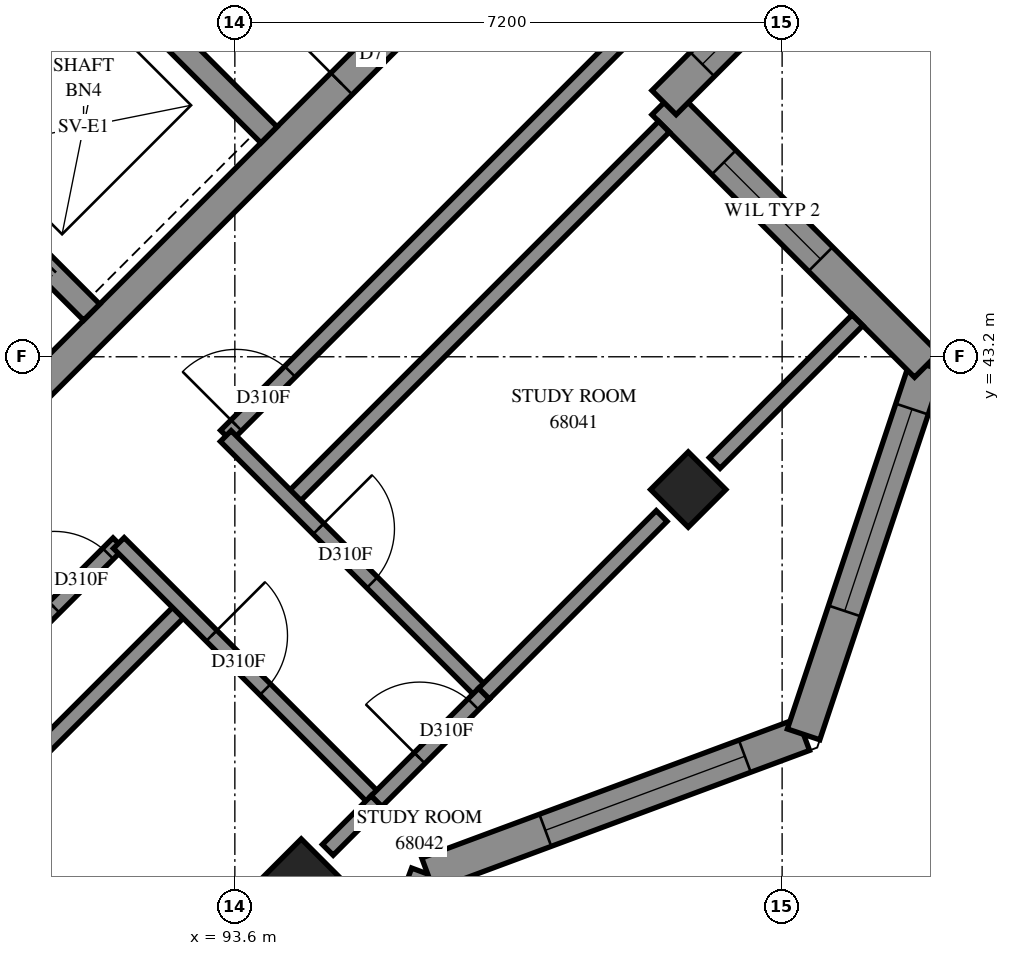
"""IFC4 building model, lengths in metres.
Left out: names, types, materials, properties, quantities, classifications, styles, units other than length and angle.
Written with IfcOpenShell. Run it as: python <this file> out.ifc"""

import sys

from ifc_helpers import new_model, si_unit, direction, frame, frame_2d, origin, origin_2d, place, context, subcontext, project, spatial, polyline, rectangle, outline, extrude, element, fill, save


model = new_model("IFC4")
c1 = context("Model", 3, precision=1e-05, world=origin(), true_north=direction((0.0, 1.0)))
c2 = subcontext(c1, "Body", "Model", "MODEL_VIEW")
j1 = project(units=[si_unit("LENGTHUNIT", "METRE"), si_unit("PLANEANGLEUNIT", "RADIAN")], contexts=[c1])
p1 = place(None, origin())
s1 = spatial("IfcSite", under=j1, at=p1, CompositionType="ELEMENT")
p2 = place(p1, origin())
s2 = spatial("IfcBuilding", under=s1, at=p2, CompositionType="ELEMENT")
p3 = place(p2, frame((0.0, 0.0, 250.6)))
s3 = spatial("IfcBuildingStorey", under=s2, at=p3, CompositionType="ELEMENT", Elevation=250.6)
for number, where, z_axis, x_axis in (
    (1, (99.565, 41.453, 0.0), (0.0, 0.0, 1.0), (0.707, -0.707, 0.0)),
    (2, (94.474, 36.362, 0.0), (0.0, 0.0, 1.0), (0.707, -0.707, 0.0)),
):
    element("IfcColumn", number, at=place(p3, frame(where, z_axis=z_axis, x_axis=x_axis)), inside=s3, PredefinedType="COLUMN", context=c2, shape_type="SweptSolid", body=[
        extrude(rectangle(XDim=0.7, YDim=0.7, at=origin_2d()), origin(), (0.0, 0.0, 1.0), 3.1),
    ])
p4 = place(p3, frame((86.978, 38.766, -0.3), z_axis=(0.0, 0.0, 1.0), x_axis=(0.7071067812, 0.7071067812, 0.0)))
e3 = element("IfcWall", 3, at=p4, inside=s3, PredefinedType="SHEAR", context=c2, shape_type="SweptSolid", body=[
    extrude(rectangle(XDim=14.4, YDim=0.4, at=frame_2d((7.2, 0.0))), origin(), (0.0, 0.0, 1.0), 2.7),
])
p5 = place(p4, frame((4.55, 0.0, 0.3)))
e4 = element("IfcOpeningElement", 4, at=p5, cuts=e3, PredefinedType="OPENING", context=c2, shape_type="SweptSolid", body=[
    extrude(rectangle(XDim=1.1, YDim=2.1, at=frame_2d((0.55, 1.05))), frame((0.0, 0.21, 0.0), z_axis=(0.0, -1.0, 0.0), x_axis=(1.0, 0.0, 0.0)), (0.0, 0.0, 1.0), 0.42),
])
p6 = place(p4, frame((11.35, 0.0, 0.3)))
e5 = element("IfcOpeningElement", 5, at=p6, cuts=e3, PredefinedType="OPENING", context=c2, shape_type="SweptSolid", body=[
    extrude(rectangle(XDim=1.1, YDim=2.1, at=frame_2d((0.55, 1.05))), frame((0.0, 0.21, 0.0), z_axis=(0.0, -1.0, 0.0), x_axis=(1.0, 0.0, 0.0)), (0.0, 0.0, 1.0), 0.42),
])
p7 = place(p3, frame((89.17, 46.332, 0.0), z_axis=(0.0, 0.0, 1.0), x_axis=(0.7071067812, 0.7071067812, 0.0)))
e6 = element("IfcWall", 6, at=p7, inside=s3, PredefinedType="SOLIDWALL", context=c2, shape_type="SweptSolid", body=[
    extrude(rectangle(XDim=3.3, YDim=0.3, at=frame_2d((1.65, 0.0))), origin(), (0.0, 0.0, 1.0), 3.1),
])
p8 = place(p3, frame((81.534, 53.969, 0.0), z_axis=(0.0, 0.0, 1.0), x_axis=(0.707103309, -0.7071102534, 0.0)))
e7 = element("IfcWall", 7, at=p8, inside=s3, PredefinedType="SOLIDWALL", context=c2, shape_type="SweptSolid", body=[
    extrude(rectangle(XDim=14.4, YDim=0.3, at=frame_2d((7.2, 0.0))), origin(), (0.0, 0.0, 1.0), 3.1),
])
p9 = place(p8, frame((8.55, 0.0, 0.0)))
e8 = element("IfcOpeningElement", 8, at=p9, cuts=e7, PredefinedType="OPENING", context=c2, shape_type="SweptSolid", body=[
    extrude(rectangle(XDim=0.9, YDim=2.1, at=frame_2d((0.45, 1.05))), frame((0.0, 0.16, 0.0), z_axis=(0.0, -1.0, 0.0), x_axis=(1.0, 0.0, 0.0)), (0.0, 0.0, 1.0), 0.32),
])
p10 = place(p8, frame((1.25, 0.0, 0.0)))
e9 = element("IfcOpeningElement", 9, at=p10, cuts=e7, PredefinedType="OPENING", context=c2, shape_type="SweptSolid", body=[
    extrude(rectangle(XDim=1.1, YDim=2.1, at=frame_2d((0.55, 1.05))), frame((0.0, 0.16, 0.0), z_axis=(0.0, -1.0, 0.0), x_axis=(1.0, 0.0, 0.0)), (0.0, 0.0, 1.0), 0.32),
])
p11 = place(p8, frame((4.85, 0.0, 0.0)))
e10 = element("IfcOpeningElement", 10, at=p11, cuts=e7, PredefinedType="OPENING", context=c2, shape_type="SweptSolid", body=[
    extrude(rectangle(XDim=1.1, YDim=2.1, at=frame_2d((0.55, 1.05))), frame((0.0, 0.16, 0.0), z_axis=(0.0, -1.0, 0.0), x_axis=(1.0, 0.0, 0.0)), (0.0, 0.0, 1.0), 0.32),
])
p12 = place(p8, frame((12.05, 0.0, 0.0)))
e11 = element("IfcOpeningElement", 11, at=p12, cuts=e7, PredefinedType="OPENING", context=c2, shape_type="SweptSolid", body=[
    extrude(rectangle(XDim=1.1, YDim=2.1, at=frame_2d((0.55, 1.05))), frame((0.0, 0.16, 0.0), z_axis=(0.0, -1.0, 0.0), x_axis=(1.0, 0.0, 0.0)), (0.0, 0.0, 1.0), 0.32),
])
p13 = place(p3, frame((88.958, 51.211, 0.0), z_axis=(0.0, 0.0, 1.0), x_axis=(0.7070998367, -0.7071137256, 0.0)))
e12 = element("IfcWall", 12, at=p13, inside=s3, PredefinedType="SOLIDWALL", context=c2, shape_type="SweptSolid", body=[
    extrude(rectangle(XDim=7.2, YDim=0.3, at=frame_2d((3.6, 0.0))), origin(), (0.0, 0.0, 1.0), 3.1),
])
p14 = place(p3, frame((94.3, 31.45, 0.0), z_axis=(0.0, 0.0, 1.0), x_axis=(0.3481927166, 0.9374229739, 0.0)))
e13 = element("IfcWall", 13, at=p14, inside=s3, PredefinedType="SOLIDWALL", context=c2, shape_type="SweptSolid", body=[
    extrude(outline(polyline([(-0.108, -0.225), (5.172, -0.225), (5.379, 0.225), (0.108, 0.225), (-0.108, -0.225)])), origin(), (0.0, 0.0, 1.0), 3.1),
])
p15 = place(p14, frame((1.534, 0.0, 0.45)))
e14 = element("IfcOpeningElement", 14, at=p15, cuts=e13, PredefinedType="OPENING", context=c2, shape_type="SweptSolid", body=[
    extrude(rectangle(XDim=2.8, YDim=2.55, at=frame_2d((1.4, 1.275))), frame((0.0, 0.235, 0.0), z_axis=(0.0, -1.0, 0.0), x_axis=(1.0, 0.0, 0.0)), (0.0, 0.0, 1.0), 0.47),
])
p16 = place(p3, frame((96.137, 36.395, 0.0), z_axis=(0.0, 0.0, 1.0), x_axis=(0.937429161, 0.3481760591, 0.0)))
e15 = element("IfcWall", 15, at=p16, inside=s3, PredefinedType="SOLIDWALL", context=c2, shape_type="SweptSolid", body=[
    extrude(outline(polyline([(0.103, -0.225), (5.383, -0.225), (5.168, 0.225), (-0.103, 0.225), (0.103, -0.225)])), origin(), (0.0, 0.0, 1.0), 3.1),
])
p17 = place(p16, frame((1.651, 0.0, 0.45)))
e16 = element("IfcOpeningElement", 16, at=p17, cuts=e15, PredefinedType="OPENING", context=c2, shape_type="SweptSolid", body=[
    extrude(rectangle(XDim=2.8, YDim=2.55, at=frame_2d((1.4, 1.275))), frame((0.0, 0.235, 0.0), z_axis=(0.0, -1.0, 0.0), x_axis=(1.0, 0.0, 0.0)), (0.0, 0.0, 1.0), 0.47),
])
p18 = place(p3, frame((101.082, 38.232, 0.0), z_axis=(0.0, 0.0, 1.0), x_axis=(0.316227766, 0.9486832981, 0.0)))
e17 = element("IfcWall", 17, at=p18, inside=s3, PredefinedType="SOLIDWALL", context=c2, shape_type="SweptSolid", body=[
    extrude(outline(polyline([(-0.108, -0.225), (5.259, -0.225), (4.981, 0.225), (0.108, 0.225), (-0.108, -0.225)])), origin(), (0.0, 0.0, 1.0), 3.1),
])
p19 = place(p18, frame((1.711, 0.0, 0.45)))
e18 = element("IfcOpeningElement", 18, at=p19, cuts=e17, PredefinedType="OPENING", context=c2, shape_type="SweptSolid", body=[
    extrude(rectangle(XDim=2.8, YDim=2.55, at=frame_2d((1.4, 1.275))), frame((0.0, 0.235, 0.0), z_axis=(0.0, -1.0, 0.0), x_axis=(1.0, 0.0, 0.0)), (0.0, 0.0, 1.0), 0.47),
])
p20 = place(p3, frame((102.701, 43.089, 0.0), z_axis=(0.0, 0.0, 1.0), x_axis=(-0.7070965479, 0.7071170144, 0.0)))
e19 = element("IfcWall", 19, at=p20, inside=s3, PredefinedType="SOLIDWALL", context=c2, shape_type="SweptSolid", body=[
    extrude(outline(polyline([(-0.139, -0.225), (4.661, -0.225), (5.111, 0.225), (0.139, 0.225), (-0.139, -0.225)])), origin(), (0.0, 0.0, 1.0), 3.1),
])
p21 = place(p20, frame((1.974, 0.0, 0.6)))
e20 = element("IfcOpeningElement", 20, at=p21, cuts=e19, PredefinedType="OPENING", context=c2, shape_type="SweptSolid", body=[
    extrude(rectangle(XDim=1.8, YDim=1.9, at=frame_2d((0.9, 0.95))), frame((0.0, 0.235, 0.0), z_axis=(0.0, -1.0, 0.0), x_axis=(1.0, 0.0, 0.0)), (0.0, 0.0, 1.0), 0.47),
])
p22 = place(p3, frame((99.246, 46.544, 0.0), z_axis=(0.0, 0.0, 1.0), x_axis=(0.7071067812, 0.7071067812, 0.0)))
e21 = element("IfcWall", 21, at=p22, inside=s3, PredefinedType="SOLIDWALL", context=c2, shape_type="SweptSolid", body=[
    extrude(outline(polyline([(0.225, -0.225), (5.986, -0.225), (5.388, 0.225), (-0.225, 0.225), (0.225, -0.225)])), origin(), (0.0, 0.0, 1.0), 3.1),
])
p23 = place(p22, frame((0.713, 0.0, 0.6)))
e22 = element("IfcOpeningElement", 22, at=p23, cuts=e21, PredefinedType="OPENING", context=c2, shape_type="SweptSolid", body=[
    extrude(rectangle(XDim=1.8, YDim=1.9, at=frame_2d((0.9, 0.95))), frame((0.0, 0.235, 0.0), z_axis=(0.0, -1.0, 0.0), x_axis=(1.0, 0.0, 0.0)), (0.0, 0.0, 1.0), 0.47),
])
p24 = place(p3, frame((84.939, 31.92, 0.0), z_axis=(0.0, 0.0, 1.0), x_axis=(0.7071067812, 0.7071067812, 0.0)))
e23 = element("IfcWall", 23, at=p24, inside=s3, PredefinedType="PARTITIONING", context=c2, shape_type="SweptSolid", body=[
    extrude(rectangle(XDim=11.283, YDim=0.2, at=frame_2d((5.641, 0.0))), origin(), (0.0, 0.0, 1.0), 3.1),
])
p25 = place(p3, frame((93.483, 42.161, 0.0), z_axis=(0.0, 0.0, 1.0), x_axis=(0.7071067812, 0.7071067812, 0.0)))
e24 = element("IfcWall", 24, at=p25, inside=s3, PredefinedType="PARTITIONING", context=c2, shape_type="SweptSolid", body=[
    extrude(rectangle(XDim=9.8, YDim=0.2, at=frame_2d((4.9, 0.0))), origin(), (0.0, 0.0, 1.0), 3.1),
])
p26 = place(p25, frame((0.193, 0.0, 0.0)))
e25 = element("IfcOpeningElement", 25, at=p26, cuts=e24, PredefinedType="OPENING", context=c2, shape_type="SweptSolid", body=[
    extrude(rectangle(XDim=1.0, YDim=2.1, at=frame_2d((0.5, 1.05))), frame((0.0, 0.11, 0.0), z_axis=(0.0, -1.0, 0.0), x_axis=(1.0, 0.0, 0.0)), (0.0, 0.0, 1.0), 0.22),
])
p27 = place(p3, frame((86.836, 35.514, 0.0), z_axis=(0.0, 0.0, 1.0), x_axis=(0.7071067812, 0.7071067812, 0.0)))
e26 = element("IfcWall", 26, at=p27, inside=s3, PredefinedType="PARTITIONING", context=c2, shape_type="SweptSolid", body=[
    extrude(rectangle(XDim=7.399, YDim=0.2, at=frame_2d((3.7, 0.0))), origin(), (0.0, 0.0, 1.0), 3.1),
])
p28 = place(p27, frame((6.207, 0.0, 0.0)))
e27 = element("IfcOpeningElement", 27, at=p28, cuts=e26, PredefinedType="OPENING", context=c2, shape_type="SweptSolid", body=[
    extrude(rectangle(XDim=1.0, YDim=2.1, at=frame_2d((0.5, 1.05))), frame((0.0, 0.11, 0.0), z_axis=(0.0, -1.0, 0.0), x_axis=(1.0, 0.0, 0.0)), (0.0, 0.0, 1.0), 0.22),
])
p29 = place(p3, frame((94.331, 41.313, 0.0), z_axis=(0.0, 0.0, 1.0), x_axis=(0.7071139756, 0.7070995867, 0.0)))
e28 = element("IfcWall", 28, at=p29, inside=s3, PredefinedType="PARTITIONING", context=c2, shape_type="SweptSolid", body=[
    extrude(rectangle(XDim=6.95, YDim=0.2, at=frame_2d((3.475, 0.0))), origin(), (0.0, 0.0, 1.0), 3.1),
])
p30 = place(p3, frame((93.481, 42.157, 0.0), z_axis=(0.0, 0.0, 1.0), x_axis=(0.7071067812, -0.7071067812, 0.0)))
e29 = element("IfcWall", 29, at=p30, inside=s3, PredefinedType="PARTITIONING", context=c2, shape_type="SweptSolid", body=[
    extrude(rectangle(XDim=4.8, YDim=0.2, at=frame_2d((2.4, 0.0))), origin(), (0.0, 0.0, 1.0), 3.1),
])
p31 = place(p30, frame((1.725, 0.0, 0.0)))
e30 = element("IfcOpeningElement", 30, at=p31, cuts=e29, PredefinedType="OPENING", context=c2, shape_type="SweptSolid", body=[
    extrude(rectangle(XDim=1.0, YDim=2.1, at=frame_2d((0.5, 1.05))), frame((0.0, 0.11, 0.0), z_axis=(0.0, -1.0, 0.0), x_axis=(1.0, 0.0, 0.0)), (0.0, 0.0, 1.0), 0.22),
])
p32 = place(p3, frame((92.073, 40.749, 0.0), z_axis=(0.0, 0.0, 1.0), x_axis=(0.7071067812, -0.7071067812, 0.0)))
e31 = element("IfcWall", 31, at=p32, inside=s3, PredefinedType="PARTITIONING", context=c2, shape_type="SweptSolid", body=[
    extrude(rectangle(XDim=4.8, YDim=0.2, at=frame_2d((2.4, 0.0))), origin(), (0.0, 0.0, 1.0), 3.1),
])
p33 = place(p32, frame((1.725, 0.0, 0.0)))
e32 = element("IfcOpeningElement", 32, at=p33, cuts=e31, PredefinedType="OPENING", context=c2, shape_type="SweptSolid", body=[
    extrude(rectangle(XDim=1.0, YDim=2.1, at=frame_2d((0.5, 1.05))), frame((0.0, 0.11, 0.0), z_axis=(0.0, -1.0, 0.0), x_axis=(1.0, 0.0, 0.0)), (0.0, 0.0, 1.0), 0.22),
])
p34 = place(p3, frame((96.877, 38.767, 0.0), z_axis=(0.0, 0.0, 1.0), x_axis=(0.7071067812, 0.7071067812, 0.0)))
e33 = element("IfcWall", 33, at=p34, inside=s3, PredefinedType="PARTITIONING", context=c2, shape_type="SweptSolid", body=[
    extrude(rectangle(XDim=3.306, YDim=0.2, at=frame_2d((1.653, 0.0))), origin(), (0.0, 0.0, 1.0), 2.6),
])
p35 = place(p3, frame((99.913, 41.803, 0.0), z_axis=(0.0, 0.0, 1.0), x_axis=(0.7071067812, 0.7071067812, 0.0)))
e34 = element("IfcWall", 34, at=p35, inside=s3, PredefinedType="PARTITIONING", context=c2, shape_type="SweptSolid", body=[
    extrude(rectangle(XDim=2.656, YDim=0.2, at=frame_2d((1.328, 0.0))), origin(), (0.0, 0.0, 1.0), 3.1),
])
p36 = place(p3, frame((95.463, 37.353, 0.0), z_axis=(0.0, 0.0, 1.0), x_axis=(0.7071067812, 0.7071067812, 0.0)))
e35 = element("IfcWall", 35, at=p36, inside=s3, PredefinedType="PARTITIONING", context=c2, shape_type="SweptSolid", body=[
    extrude(rectangle(XDim=2.0, YDim=0.2, at=frame_2d((1.0, 0.0))), origin(), (0.0, 0.0, 1.0), 2.6),
])
p37 = place(p36, frame((0.802, 0.0, 0.0)))
e36 = element("IfcOpeningElement", 36, at=p37, cuts=e35, PredefinedType="OPENING", context=c2, shape_type="SweptSolid", body=[
    extrude(rectangle(XDim=1.0, YDim=2.1, at=frame_2d((0.5, 1.05))), frame((0.0, 0.11, 0.0), z_axis=(0.0, -1.0, 0.0), x_axis=(1.0, 0.0, 0.0)), (0.0, 0.0, 1.0), 0.22),
])
p38 = place(p3, frame((94.823, 36.713, 0.0), z_axis=(0.0, 0.0, 1.0), x_axis=(0.7071067812, 0.7071067812, 0.0)))
e37 = element("IfcWall", 37, at=p38, inside=s3, PredefinedType="PARTITIONING", context=c2, shape_type="SweptSolid", body=[
    extrude(rectangle(XDim=0.905, YDim=0.2, at=frame_2d((0.453, 0.0))), origin(), (0.0, 0.0, 1.0), 2.6),
])
p39 = place(p17, origin())
e38 = element("IfcWindow", 38, at=p39, inside=s3, PartitioningType="SINGLE_PANEL", PredefinedType="WINDOW", context=c2, shape_type="SweptSolid", body=[
    extrude(rectangle(XDim=2.8, YDim=2.55, at=frame_2d((1.4, 1.275))), frame((0.0, 0.205, 0.0), z_axis=(0.0, -1.0, 0.0), x_axis=(1.0, 0.0, 0.0)), (0.0, 0.0, 1.0), 0.06),
])
fill(e16, e38)
p40 = place(p19, origin())
e39 = element("IfcWindow", 39, at=p40, inside=s3, PartitioningType="SINGLE_PANEL", PredefinedType="WINDOW", context=c2, shape_type="SweptSolid", body=[
    extrude(rectangle(XDim=2.8, YDim=2.55, at=frame_2d((1.4, 1.275))), frame((0.0, 0.205, 0.0), z_axis=(0.0, -1.0, 0.0), x_axis=(1.0, 0.0, 0.0)), (0.0, 0.0, 1.0), 0.06),
])
fill(e18, e39)
p41 = place(p21, origin())
e40 = element("IfcWindow", 40, at=p41, inside=s3, PartitioningType="SINGLE_PANEL", PredefinedType="WINDOW", context=c2, shape_type="SweptSolid", body=[
    extrude(rectangle(XDim=1.8, YDim=1.9, at=frame_2d((0.9, 0.95))), frame((0.0, 0.205, 0.0), z_axis=(0.0, -1.0, 0.0), x_axis=(1.0, 0.0, 0.0)), (0.0, 0.0, 1.0), 0.06),
])
fill(e20, e40)
p42 = place(p23, origin())
e41 = element("IfcWindow", 41, at=p42, inside=s3, PartitioningType="SINGLE_PANEL", PredefinedType="WINDOW", context=c2, shape_type="SweptSolid", body=[
    extrude(rectangle(XDim=1.8, YDim=1.9, at=frame_2d((0.9, 0.95))), frame((0.0, 0.205, 0.0), z_axis=(0.0, -1.0, 0.0), x_axis=(1.0, 0.0, 0.0)), (0.0, 0.0, 1.0), 0.06),
])
fill(e22, e41)
p43 = place(p6, origin())
e42 = element("IfcDoor", 42, at=p43, inside=s3, OperationType="SINGLE_SWING_RIGHT", PredefinedType="DOOR", context=c2, shape_type="SweptSolid", body=[
    extrude(rectangle(XDim=1.1, YDim=2.1, at=frame_2d((0.55, 1.05))), frame((0.0, 0.025, 0.0), z_axis=(0.0, -1.0, 0.0), x_axis=(1.0, 0.0, 0.0)), (0.0, 0.0, 1.0), 0.05),
])
fill(e5, e42)
p44 = place(p28, origin())
e43 = element("IfcDoor", 43, at=p44, inside=s3, OperationType="SINGLE_SWING_RIGHT", PredefinedType="DOOR", context=c2, shape_type="SweptSolid", body=[
    extrude(rectangle(XDim=1.0, YDim=2.1, at=frame_2d((0.5, 1.05))), frame((0.0, 0.025, 0.0), z_axis=(0.0, -1.0, 0.0), x_axis=(1.0, 0.0, 0.0)), (0.0, 0.0, 1.0), 0.05),
])
fill(e27, e43)
p45 = place(p33, origin())
e44 = element("IfcDoor", 44, at=p45, inside=s3, OperationType="SINGLE_SWING_LEFT", PredefinedType="DOOR", context=c2, shape_type="SweptSolid", body=[
    extrude(rectangle(XDim=1.0, YDim=2.1, at=frame_2d((0.5, 1.05))), frame((0.0, 0.025, 0.0), z_axis=(0.0, -1.0, 0.0), x_axis=(1.0, 0.0, 0.0)), (0.0, 0.0, 1.0), 0.05),
])
fill(e32, e44)
p46 = place(p26, origin())
e45 = element("IfcDoor", 45, at=p46, inside=s3, OperationType="SINGLE_SWING_LEFT", PredefinedType="DOOR", context=c2, shape_type="SweptSolid", body=[
    extrude(rectangle(XDim=1.0, YDim=2.1, at=frame_2d((0.5, 1.05))), frame((0.0, 0.025, 0.0), z_axis=(0.0, -1.0, 0.0), x_axis=(1.0, 0.0, 0.0)), (0.0, 0.0, 1.0), 0.05),
])
fill(e25, e45)
p47 = place(p31, origin())
e46 = element("IfcDoor", 46, at=p47, inside=s3, OperationType="SINGLE_SWING_RIGHT", PredefinedType="DOOR", context=c2, shape_type="SweptSolid", body=[
    extrude(rectangle(XDim=1.0, YDim=2.1, at=frame_2d((0.5, 1.05))), frame((0.0, 0.025, 0.0), z_axis=(0.0, -1.0, 0.0), x_axis=(1.0, 0.0, 0.0)), (0.0, 0.0, 1.0), 0.05),
])
fill(e30, e46)
p48 = place(p37, origin())
e47 = element("IfcDoor", 47, at=p48, inside=s3, OperationType="SINGLE_SWING_RIGHT", PredefinedType="DOOR", context=c2, shape_type="SweptSolid", body=[
    extrude(rectangle(XDim=1.0, YDim=2.1, at=frame_2d((0.5, 1.05))), frame((0.0, 0.025, 0.0), z_axis=(0.0, -1.0, 0.0), x_axis=(1.0, 0.0, 0.0)), (0.0, 0.0, 1.0), 0.05),
])
fill(e36, e47)
save(model, sys.argv[1])
